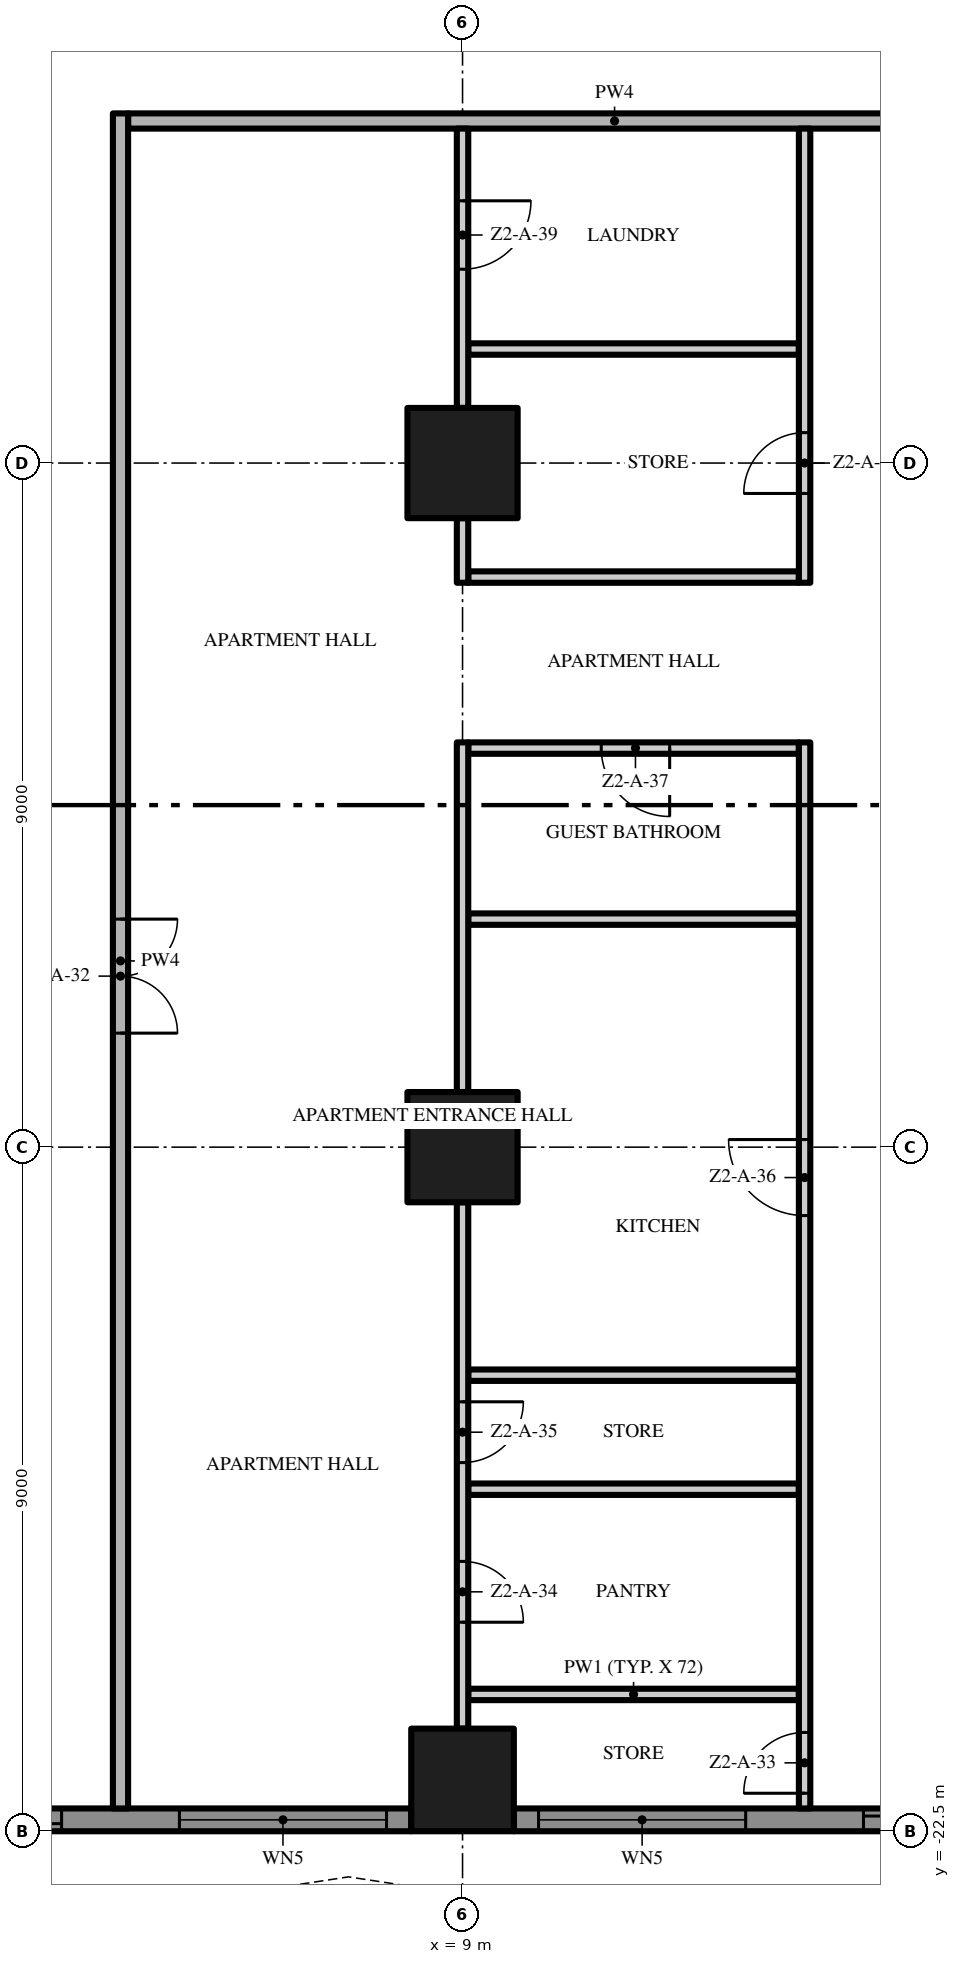
"""IFC4 building model, lengths in metres.
Left out: names, types, materials, properties, quantities, classifications, styles, units other than length and angle.
Written with IfcOpenShell. Run it as: python <this file> out.ifc"""

import sys

from ifc_helpers import new_model, si_unit, direction, frame, frame_2d, origin, origin_2d, place, context, subcontext, project, spatial, polyline, rectangle, outline, extrude, element, fill, save


model = new_model("IFC4")
c1 = context("Model", 3, precision=1e-05, world=origin(), true_north=direction((0.0, 1.0)))
c2 = subcontext(c1, "Body", "Model", "MODEL_VIEW")
j1 = project(units=[si_unit("LENGTHUNIT", "METRE"), si_unit("PLANEANGLEUNIT", "RADIAN")], contexts=[c1])
p1 = place(None, origin())
s1 = spatial("IfcSite", under=j1, at=p1, CompositionType="ELEMENT")
p2 = place(p1, origin())
s2 = spatial("IfcBuilding", under=s1, at=p2, CompositionType="ELEMENT")
p3 = place(p2, frame((0.0, 0.0, 69.4)))
s3 = spatial("IfcBuildingStorey", under=s2, at=p3, CompositionType="ELEMENT", Elevation=69.4)
p4 = place(p3, frame((9.0, -13.5, 0.0), z_axis=(0.0, 0.0, 1.0), x_axis=(1.0, 0.0, 0.0)))
e1 = element("IfcColumn", 1, at=p4, inside=s3, PredefinedType="COLUMN", context=c2, shape_type="SweptSolid", body=[
    extrude(rectangle(XDim=1.45, YDim=1.45, at=origin_2d()), origin(), (0.0, 0.0, 1.0), 3.5),
])
p5 = place(p3, frame((9.0, -21.825, 0.0), z_axis=(0.0, 0.0, 1.0), x_axis=(1.0, 0.0, 0.0)))
e2 = element("IfcColumn", 2, at=p5, inside=s3, PredefinedType="COLUMN", context=c2, shape_type="SweptSolid", body=[
    extrude(rectangle(XDim=1.35, YDim=1.35, at=origin_2d()), origin(), (0.0, 0.0, 1.0), 3.5),
])
p6 = place(p3, frame((9.0, -4.5, 0.0), z_axis=(0.0, 0.0, 1.0), x_axis=(1.0, 0.0, 0.0)))
e3 = element("IfcColumn", 3, at=p6, inside=s3, PredefinedType="COLUMN", context=c2, shape_type="SweptSolid", body=[
    extrude(rectangle(XDim=1.45, YDim=1.45, at=origin_2d()), origin(), (0.0, 0.0, 1.0), 3.5),
])
p7 = place(p3, frame((8.325, -22.35, 0.0), z_axis=(0.0, 0.0, 1.0), x_axis=(-1.0, 0.0, 0.0)))
e4 = element("IfcWall", 4, at=p7, inside=s3, PredefinedType="SOLIDWALL", context=c2, shape_type="SweptSolid", body=[
    extrude(rectangle(XDim=7.65, YDim=0.3, at=frame_2d((3.825, 0.0))), origin(), (0.0, 0.0, 1.0), 3.5),
])
p8 = place(p7, frame((4.6, 0.0, 0.0)))
e5 = element("IfcOpeningElement", 5, at=p8, cuts=e4, PredefinedType="OPENING", context=c2, shape_type="SweptSolid", body=[
    extrude(rectangle(XDim=2.725, YDim=2.4, at=frame_2d((1.363, 1.2))), frame((0.0, 0.16, 0.0), z_axis=(0.0, -1.0, 0.0), x_axis=(1.0, 0.0, 0.0)), (0.0, 0.0, 1.0), 0.32),
])
p9 = place(p7, frame((0.325, 0.0, 0.45)))
e6 = element("IfcOpeningElement", 6, at=p9, cuts=e4, PredefinedType="OPENING", context=c2, shape_type="SweptSolid", body=[
    extrude(rectangle(XDim=2.725, YDim=2.65, at=frame_2d((1.363, 1.325))), frame((0.0, 0.16, 0.0), z_axis=(0.0, -1.0, 0.0), x_axis=(1.0, 0.0, 0.0)), (0.0, 0.0, 1.0), 0.32),
])
p10 = place(p3, frame((17.325, -22.35, 0.0), z_axis=(0.0, 0.0, 1.0), x_axis=(-1.0, 0.0, 0.0)))
e7 = element("IfcWall", 7, at=p10, inside=s3, PredefinedType="SOLIDWALL", context=c2, shape_type="SweptSolid", body=[
    extrude(rectangle(XDim=7.65, YDim=0.3, at=frame_2d((3.825, 0.0))), origin(), (0.0, 0.0, 1.0), 3.5),
])
p11 = place(p10, frame((4.6, 0.0, 0.45)))
e8 = element("IfcOpeningElement", 8, at=p11, cuts=e7, PredefinedType="OPENING", context=c2, shape_type="SweptSolid", body=[
    extrude(rectangle(XDim=2.725, YDim=2.65, at=frame_2d((1.363, 1.325))), frame((0.0, 0.16, 0.0), z_axis=(0.0, -1.0, 0.0), x_axis=(1.0, 0.0, 0.0)), (0.0, 0.0, 1.0), 0.32),
])
p12 = place(p10, frame((0.325, 0.0, 0.0)))
e9 = element("IfcOpeningElement", 9, at=p12, cuts=e7, PredefinedType="OPENING", context=c2, shape_type="SweptSolid", body=[
    extrude(rectangle(XDim=2.725, YDim=2.4, at=frame_2d((1.363, 1.2))), frame((0.0, 0.16, 0.0), z_axis=(0.0, -1.0, 0.0), x_axis=(1.0, 0.0, 0.0)), (0.0, 0.0, 1.0), 0.32),
])
p13 = place(p3, origin())
e10 = element("IfcWall", 10, at=p13, inside=s3, PredefinedType="USERDEFINED", context=c2, shape_type="SweptSolid", body=[
    extrude(outline(polyline([(-22.5, -23.1), (-21.0, -23.329), (-19.5, -23.929), (-18.0, -24.671), (-16.5, -25.271), (-15.0, -25.5), (-13.5, -25.271), (-12.0, -24.671), (-10.5, -23.929), (-9.0, -23.329), (-7.5, -23.1), (-6.0, -23.329), (-4.5, -23.929), (-3.0, -24.671), (-1.5, -25.271), (0.0, -25.5), (1.5, -25.271), (3.0, -24.671), (4.5, -23.929), (6.0, -23.329), (7.5, -23.1), (9.0, -23.329), (10.5, -23.929), (12.0, -24.671), (13.5, -25.271), (15.0, -25.5), (16.5, -25.271), (18.0, -24.671), (19.5, -23.929), (21.0, -23.329), (22.5, -23.1), (22.462, -22.853), (20.934, -23.086), (19.398, -23.701), (17.898, -24.442), (16.434, -25.028), (15.0, -25.247), (13.566, -25.028), (12.102, -24.442), (10.602, -23.701), (9.066, -23.086), (7.5, -22.847), (5.934, -23.086), (4.398, -23.701), (2.898, -24.442), (1.434, -25.028), (0.0, -25.247), (-1.434, -25.028), (-2.898, -24.442), (-4.398, -23.701), (-5.934, -23.086), (-7.5, -22.847), (-9.066, -23.086), (-10.602, -23.701), (-12.102, -24.442), (-13.566, -25.028), (-15.0, -25.247), (-16.434, -25.028), (-17.898, -24.442), (-19.398, -23.701), (-20.934, -23.086), (-22.462, -22.853), (-22.5, -23.1)])), origin(), (0.0, 0.0, 1.0), 0.9),
])
for number, where, z_axis, x_axis in (
    (11, (9.075, -20.7, 0.0), (0.0, 0.0, 1.0), (1.0, 0.0, 0.0)),
    (12, (9.075, -18.0, 0.0), (0.0, 0.0, 1.0), (1.0, 0.0, 0.0)),
    (13, (9.075, -16.5, 0.0), (0.0, 0.0, 1.0), (1.0, 0.0, 0.0)),
    (14, (9.075, -10.5, 0.0), (0.0, 0.0, 1.0), (1.0, 0.0, 0.0)),
):
    element("IfcWall", number, at=place(p3, frame(where, z_axis=z_axis, x_axis=x_axis)), inside=s3, PredefinedType="PARTITIONING", context=c2, shape_type="SweptSolid", body=[
        extrude(rectangle(XDim=4.35, YDim=0.15, at=frame_2d((2.175, 0.0))), origin(), (0.0, 0.0, 1.0), 3.5),
    ])
p14 = place(p3, frame((13.425, -8.25, 0.0), z_axis=(0.0, 0.0, 1.0), x_axis=(-1.0, 0.0, 0.0)))
e15 = element("IfcWall", 15, at=p14, inside=s3, PredefinedType="PARTITIONING", context=c2, shape_type="SweptSolid", body=[
    extrude(rectangle(XDim=4.35, YDim=0.15, at=frame_2d((2.175, 0.0))), origin(), (0.0, 0.0, 1.0), 3.5),
])
p15 = place(p14, frame((1.7, 0.0, 0.0)))
e16 = element("IfcOpeningElement", 16, at=p15, cuts=e15, PredefinedType="OPENING", context=c2, shape_type="SweptSolid", body=[
    extrude(rectangle(XDim=0.9, YDim=2.1, at=frame_2d((0.45, 1.05))), frame((0.0, 0.085, 0.0), z_axis=(0.0, -1.0, 0.0), x_axis=(1.0, 0.0, 0.0)), (0.0, 0.0, 1.0), 0.17),
])
for number, where, z_axis, x_axis in (
    (17, (9.075, -6.0, 0.0), (0.0, 0.0, 1.0), (1.0, 0.0, 0.0)),
    (18, (9.075, -3.0, 0.0), (0.0, 0.0, 1.0), (1.0, 0.0, 0.0)),
):
    element("IfcWall", number, at=place(p3, frame(where, z_axis=z_axis, x_axis=x_axis)), inside=s3, PredefinedType="PARTITIONING", context=c2, shape_type="SweptSolid", body=[
        extrude(rectangle(XDim=4.35, YDim=0.15, at=frame_2d((2.175, 0.0))), origin(), (0.0, 0.0, 1.0), 3.5),
    ])
p16 = place(p3, frame((4.6, 0.0, 0.0), z_axis=(0.0, 0.0, 1.0), x_axis=(1.0, 0.0, 0.0)))
e19 = element("IfcWall", 19, at=p16, inside=s3, PredefinedType="PARTITIONING", context=c2, shape_type="SweptSolid", body=[
    extrude(rectangle(XDim=12.8, YDim=0.2, at=frame_2d((6.4, 0.0))), origin(), (0.0, 0.0, 1.0), 3.5),
])
p17 = place(p3, frame((4.5, 0.1, 0.0), z_axis=(0.0, 0.0, 1.0), x_axis=(0.0, -1.0, 0.0)))
e20 = element("IfcWall", 20, at=p17, inside=s3, PredefinedType="PARTITIONING", context=c2, shape_type="SweptSolid", body=[
    extrude(rectangle(XDim=22.3, YDim=0.2, at=frame_2d((11.15, 0.0))), origin(), (0.0, 0.0, 1.0), 3.5),
])
p18 = place(p17, frame((10.6, 0.0, 0.0)))
e21 = element("IfcOpeningElement", 21, at=p18, cuts=e20, PredefinedType="OPENING", context=c2, shape_type="SweptSolid", body=[
    extrude(rectangle(XDim=1.5, YDim=2.4, at=frame_2d((0.75, 1.2))), frame((0.0, 0.11, 0.0), z_axis=(0.0, -1.0, 0.0), x_axis=(1.0, 0.0, 0.0)), (0.0, 0.0, 1.0), 0.22),
])
p19 = place(p3, frame((9.0, -14.225, 0.0), z_axis=(0.0, 0.0, 1.0), x_axis=(0.0, -1.0, 0.0)))
e22 = element("IfcWall", 22, at=p19, inside=s3, PredefinedType="PARTITIONING", context=c2, shape_type="SweptSolid", body=[
    extrude(rectangle(XDim=6.925, YDim=0.15, at=frame_2d((3.462, 0.0))), origin(), (0.0, 0.0, 1.0), 3.5),
])
p20 = place(p19, frame((4.725, 0.0, 0.0)))
e23 = element("IfcOpeningElement", 23, at=p20, cuts=e22, PredefinedType="OPENING", context=c2, shape_type="SweptSolid", body=[
    extrude(rectangle(XDim=0.8, YDim=2.0, at=frame_2d((0.4, 1.0))), frame((0.0, 0.085, 0.0), z_axis=(0.0, -1.0, 0.0), x_axis=(1.0, 0.0, 0.0)), (0.0, 0.0, 1.0), 0.17),
])
p21 = place(p19, frame((2.625, 0.0, 0.0)))
e24 = element("IfcOpeningElement", 24, at=p21, cuts=e22, PredefinedType="OPENING", context=c2, shape_type="SweptSolid", body=[
    extrude(rectangle(XDim=0.8, YDim=2.0, at=frame_2d((0.4, 1.0))), frame((0.0, 0.085, 0.0), z_axis=(0.0, -1.0, 0.0), x_axis=(1.0, 0.0, 0.0)), (0.0, 0.0, 1.0), 0.17),
])
p22 = place(p3, frame((9.0, -12.775, 0.0), z_axis=(0.0, 0.0, 1.0), x_axis=(0.0, 1.0, 0.0)))
e25 = element("IfcWall", 25, at=p22, inside=s3, PredefinedType="PARTITIONING", context=c2, shape_type="SweptSolid", body=[
    extrude(rectangle(XDim=4.6, YDim=0.15, at=frame_2d((2.3, 0.0))), origin(), (0.0, 0.0, 1.0), 3.5),
])
p23 = place(p3, frame((9.0, -6.075, 0.0), z_axis=(0.0, 0.0, 1.0), x_axis=(0.0, 1.0, 0.0)))
e26 = element("IfcWall", 26, at=p23, inside=s3, PredefinedType="PARTITIONING", context=c2, shape_type="SweptSolid", body=[
    extrude(rectangle(XDim=0.85, YDim=0.15, at=frame_2d((0.425, 0.0))), origin(), (0.0, 0.0, 1.0), 3.5),
])
p24 = place(p3, frame((9.0, -0.1, 0.0), z_axis=(0.0, 0.0, 1.0), x_axis=(0.0, -1.0, 0.0)))
e27 = element("IfcWall", 27, at=p24, inside=s3, PredefinedType="PARTITIONING", context=c2, shape_type="SweptSolid", body=[
    extrude(rectangle(XDim=3.675, YDim=0.15, at=frame_2d((1.837, 0.0))), origin(), (0.0, 0.0, 1.0), 3.5),
])
p25 = place(p24, frame((0.95, 0.0, 0.0)))
e28 = element("IfcOpeningElement", 28, at=p25, cuts=e27, PredefinedType="OPENING", context=c2, shape_type="SweptSolid", body=[
    extrude(rectangle(XDim=0.9, YDim=2.1, at=frame_2d((0.45, 1.05))), frame((0.0, 0.085, 0.0), z_axis=(0.0, -1.0, 0.0), x_axis=(1.0, 0.0, 0.0)), (0.0, 0.0, 1.0), 0.17),
])
p26 = place(p3, frame((13.5, -22.2, 0.0), z_axis=(0.0, 0.0, 1.0), x_axis=(0.0, 1.0, 0.0)))
e29 = element("IfcWall", 29, at=p26, inside=s3, PredefinedType="PARTITIONING", context=c2, shape_type="SweptSolid", body=[
    extrude(rectangle(XDim=14.025, YDim=0.15, at=frame_2d((7.013, 0.0))), origin(), (0.0, 0.0, 1.0), 3.5),
])
p27 = place(p26, frame((0.2, 0.0, 0.0)))
e30 = element("IfcOpeningElement", 30, at=p27, cuts=e29, PredefinedType="OPENING", context=c2, shape_type="SweptSolid", body=[
    extrude(rectangle(XDim=0.8, YDim=2.0, at=frame_2d((0.4, 1.0))), frame((0.0, 0.085, 0.0), z_axis=(0.0, -1.0, 0.0), x_axis=(1.0, 0.0, 0.0)), (0.0, 0.0, 1.0), 0.17),
])
p28 = place(p26, frame((7.8, 0.0, 0.0)))
e31 = element("IfcOpeningElement", 31, at=p28, cuts=e29, PredefinedType="OPENING", context=c2, shape_type="SweptSolid", body=[
    extrude(rectangle(XDim=1.0, YDim=2.4, at=frame_2d((0.5, 1.2))), frame((0.0, 0.085, 0.0), z_axis=(0.0, -1.0, 0.0), x_axis=(1.0, 0.0, 0.0)), (0.0, 0.0, 1.0), 0.17),
])
p29 = place(p3, frame((13.5, -6.075, 0.0), z_axis=(0.0, 0.0, 1.0), x_axis=(0.0, 1.0, 0.0)))
e32 = element("IfcWall", 32, at=p29, inside=s3, PredefinedType="PARTITIONING", context=c2, shape_type="SweptSolid", body=[
    extrude(rectangle(XDim=5.975, YDim=0.15, at=frame_2d((2.987, 0.0))), origin(), (0.0, 0.0, 1.0), 3.5),
])
p30 = place(p29, frame((1.175, 0.0, 0.0)))
e33 = element("IfcOpeningElement", 33, at=p30, cuts=e32, PredefinedType="OPENING", context=c2, shape_type="SweptSolid", body=[
    extrude(rectangle(XDim=0.8, YDim=2.0, at=frame_2d((0.4, 1.0))), frame((0.0, 0.085, 0.0), z_axis=(0.0, -1.0, 0.0), x_axis=(1.0, 0.0, 0.0)), (0.0, 0.0, 1.0), 0.17),
])
p31 = place(p8, origin())
e34 = element("IfcDoor", 34, at=p31, inside=s3, OperationType="SINGLE_SWING_LEFT", PredefinedType="DOOR", context=c2, shape_type="SweptSolid", body=[
    extrude(rectangle(XDim=2.725, YDim=2.4, at=frame_2d((1.363, 1.2))), frame((0.0, 0.025, 0.0), z_axis=(0.0, -1.0, 0.0), x_axis=(1.0, 0.0, 0.0)), (0.0, 0.0, 1.0), 0.05),
])
fill(e5, e34)
p32 = place(p9, origin())
e35 = element("IfcWindow", 35, at=p32, inside=s3, PartitioningType="SINGLE_PANEL", PredefinedType="WINDOW", context=c2, shape_type="SweptSolid", body=[
    extrude(rectangle(XDim=2.725, YDim=2.65, at=frame_2d((1.363, 1.325))), frame((0.0, 0.03, 0.0), z_axis=(0.0, -1.0, 0.0), x_axis=(1.0, 0.0, 0.0)), (0.0, 0.0, 1.0), 0.06),
])
fill(e6, e35)
p33 = place(p11, origin())
e36 = element("IfcWindow", 36, at=p33, inside=s3, PartitioningType="SINGLE_PANEL", PredefinedType="WINDOW", context=c2, shape_type="SweptSolid", body=[
    extrude(rectangle(XDim=2.725, YDim=2.65, at=frame_2d((1.363, 1.325))), frame((0.0, 0.03, 0.0), z_axis=(0.0, -1.0, 0.0), x_axis=(1.0, 0.0, 0.0)), (0.0, 0.0, 1.0), 0.06),
])
fill(e8, e36)
p34 = place(p12, origin())
e37 = element("IfcDoor", 37, at=p34, inside=s3, OperationType="SINGLE_SWING_LEFT", PredefinedType="DOOR", context=c2, shape_type="SweptSolid", body=[
    extrude(rectangle(XDim=2.725, YDim=2.4, at=frame_2d((1.363, 1.2))), frame((0.0, 0.025, 0.0), z_axis=(0.0, -1.0, 0.0), x_axis=(1.0, 0.0, 0.0)), (0.0, 0.0, 1.0), 0.05),
])
fill(e9, e37)
p35 = place(p18, origin())
e38 = element("IfcDoor", 38, at=p35, inside=s3, OperationType="DOUBLE_DOOR_SINGLE_SWING", PredefinedType="DOOR", context=c2, shape_type="SweptSolid", body=[
    extrude(rectangle(XDim=1.5, YDim=2.4, at=frame_2d((0.75, 1.2))), frame((0.0, 0.025, 0.0), z_axis=(0.0, -1.0, 0.0), x_axis=(1.0, 0.0, 0.0)), (0.0, 0.0, 1.0), 0.05),
])
fill(e21, e38)
p36 = place(p27, origin())
e39 = element("IfcDoor", 39, at=p36, inside=s3, OperationType="SINGLE_SWING_LEFT", PredefinedType="DOOR", context=c2, shape_type="SweptSolid", body=[
    extrude(rectangle(XDim=0.8, YDim=2.0, at=frame_2d((0.4, 1.0))), frame((0.0, 0.025, 0.0), z_axis=(0.0, -1.0, 0.0), x_axis=(1.0, 0.0, 0.0)), (0.0, 0.0, 1.0), 0.05),
])
fill(e30, e39)
p37 = place(p20, origin())
e40 = element("IfcDoor", 40, at=p37, inside=s3, OperationType="SINGLE_SWING_RIGHT", PredefinedType="DOOR", context=c2, shape_type="SweptSolid", body=[
    extrude(rectangle(XDim=0.8, YDim=2.0, at=frame_2d((0.4, 1.0))), frame((0.0, 0.025, 0.0), z_axis=(0.0, -1.0, 0.0), x_axis=(1.0, 0.0, 0.0)), (0.0, 0.0, 1.0), 0.05),
])
fill(e23, e40)
p38 = place(p21, origin())
e41 = element("IfcDoor", 41, at=p38, inside=s3, OperationType="SINGLE_SWING_LEFT", PredefinedType="DOOR", context=c2, shape_type="SweptSolid", body=[
    extrude(rectangle(XDim=0.8, YDim=2.0, at=frame_2d((0.4, 1.0))), frame((0.0, 0.025, 0.0), z_axis=(0.0, -1.0, 0.0), x_axis=(1.0, 0.0, 0.0)), (0.0, 0.0, 1.0), 0.05),
])
fill(e24, e41)
p39 = place(p28, origin())
e42 = element("IfcDoor", 42, at=p39, inside=s3, OperationType="SINGLE_SWING_RIGHT", PredefinedType="DOOR", context=c2, shape_type="SweptSolid", body=[
    extrude(rectangle(XDim=1.0, YDim=2.4, at=frame_2d((0.5, 1.2))), frame((0.0, 0.025, 0.0), z_axis=(0.0, -1.0, 0.0), x_axis=(1.0, 0.0, 0.0)), (0.0, 0.0, 1.0), 0.05),
])
fill(e31, e42)
p40 = place(p15, origin())
e43 = element("IfcDoor", 43, at=p40, inside=s3, OperationType="SINGLE_SWING_LEFT", PredefinedType="DOOR", context=c2, shape_type="SweptSolid", body=[
    extrude(rectangle(XDim=0.9, YDim=2.1, at=frame_2d((0.45, 1.05))), frame((0.0, 0.025, 0.0), z_axis=(0.0, -1.0, 0.0), x_axis=(1.0, 0.0, 0.0)), (0.0, 0.0, 1.0), 0.05),
])
fill(e16, e43)
p41 = place(p30, origin())
e44 = element("IfcDoor", 44, at=p41, inside=s3, OperationType="SINGLE_SWING_LEFT", PredefinedType="DOOR", context=c2, shape_type="SweptSolid", body=[
    extrude(rectangle(XDim=0.8, YDim=2.0, at=frame_2d((0.4, 1.0))), frame((0.0, 0.025, 0.0), z_axis=(0.0, -1.0, 0.0), x_axis=(1.0, 0.0, 0.0)), (0.0, 0.0, 1.0), 0.05),
])
fill(e33, e44)
p42 = place(p25, origin())
e45 = element("IfcDoor", 45, at=p42, inside=s3, OperationType="SINGLE_SWING_LEFT", PredefinedType="DOOR", context=c2, shape_type="SweptSolid", body=[
    extrude(rectangle(XDim=0.9, YDim=2.1, at=frame_2d((0.45, 1.05))), frame((0.0, 0.025, 0.0), z_axis=(0.0, -1.0, 0.0), x_axis=(1.0, 0.0, 0.0)), (0.0, 0.0, 1.0), 0.05),
])
fill(e28, e45)
save(model, sys.argv[1])
